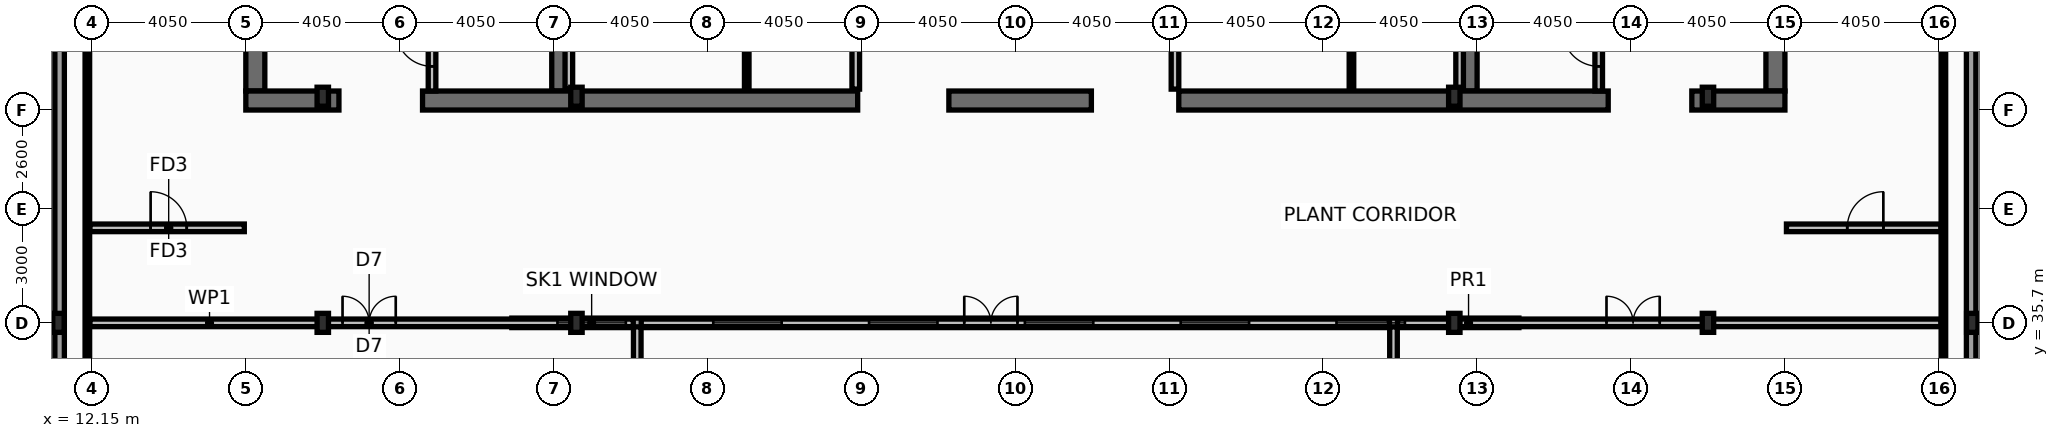
"""IFC4 building model, lengths in metres.
Left out: names, types, materials, properties, quantities, classifications, styles, units other than length and angle.
Written with IfcOpenShell. Run it as: python <this file> out.ifc"""

import sys

from ifc_helpers import new_model, si_unit, direction, frame, frame_2d, origin, origin_2d, place, context, subcontext, project, spatial, rectangle, i_section, extrude, element, fill, save


model = new_model("IFC4")
c1 = context("Model", 3, precision=1e-05, world=origin(), true_north=direction((0.0, 1.0)))
c2 = subcontext(c1, "Body", "Model", "MODEL_VIEW")
j1 = project(units=[si_unit("LENGTHUNIT", "METRE"), si_unit("PLANEANGLEUNIT", "RADIAN")], contexts=[c1])
p1 = place(None, origin())
s1 = spatial("IfcSite", under=j1, at=p1, CompositionType="ELEMENT")
p2 = place(p1, origin())
s2 = spatial("IfcBuilding", under=s1, at=p2, CompositionType="ELEMENT")
p3 = place(p2, frame((0.0, 0.0, 378.6)))
s3 = spatial("IfcBuildingStorey", under=s2, at=p3, CompositionType="ELEMENT", Elevation=378.6)
for number, where, z_axis, x_axis in (
    (1, (16.45, 41.8, 0.0), (0.0, 0.0, 1.0), (0.0, 1.0, 0.0)),
    (2, (56.45, 53.2, 0.0), (0.0, 0.0, 1.0), (0.0, -1.0, 0.0)),
):
    element("IfcWall", number, at=place(p3, frame(where, z_axis=z_axis, x_axis=x_axis)), inside=s3, PredefinedType="SHEAR", context=c2, shape_type="SweptSolid", body=[
        extrude(rectangle(XDim=11.4, YDim=0.5, at=frame_2d((5.7, 0.0))), origin(), (0.0, 0.0, 1.0), 4.0),
    ])
for number, where, z_axis, x_axis in (
    (3, (24.45, 41.8, 0.0), (0.0, 0.0, 1.0), (0.0, 1.0, 0.0)),
    (4, (48.4, 41.8, 0.0), (0.0, 0.0, 1.0), (0.0, 1.0, 0.0)),
):
    element("IfcWall", number, at=place(p3, frame(where, z_axis=z_axis, x_axis=x_axis)), inside=s3, PredefinedType="SHEAR", context=c2, shape_type="SweptSolid", body=[
        extrude(rectangle(XDim=11.4, YDim=0.4, at=frame_2d((5.7, 0.0))), origin(), (0.0, 0.0, 1.0), 4.0),
    ])
p4 = place(p3, frame((18.65, 41.55, 0.0), z_axis=(0.0, 0.0, 1.0), x_axis=(-1.0, 0.0, 0.0)))
e5 = element("IfcWall", 5, at=p4, inside=s3, PredefinedType="SHEAR", context=c2, shape_type="SweptSolid", body=[
    extrude(rectangle(XDim=2.45, YDim=0.5, at=frame_2d((1.225, 0.0))), origin(), (0.0, 0.0, 1.0), 4.0),
])
p5 = place(p3, frame((32.3, 41.55, 0.0), z_axis=(0.0, 0.0, 1.0), x_axis=(-1.0, 0.0, 0.0)))
e6 = element("IfcWall", 6, at=p5, inside=s3, PredefinedType="SHEAR", context=c2, shape_type="SweptSolid", body=[
    extrude(rectangle(XDim=11.45, YDim=0.5, at=frame_2d((5.725, 0.0))), origin(), (0.0, 0.0, 1.0), 4.0),
])
p6 = place(p3, frame((38.45, 41.55, 0.0), z_axis=(0.0, 0.0, 1.0), x_axis=(-1.0, 0.0, 0.0)))
e7 = element("IfcWall", 7, at=p6, inside=s3, PredefinedType="SHEAR", context=c2, shape_type="SweptSolid", body=[
    extrude(rectangle(XDim=3.75, YDim=0.5, at=frame_2d((1.875, 0.0))), origin(), (0.0, 0.0, 1.0), 4.0),
])
p7 = place(p3, frame((52.05, 41.55, 0.0), z_axis=(0.0, 0.0, 1.0), x_axis=(-1.0, 0.0, 0.0)))
e8 = element("IfcWall", 8, at=p7, inside=s3, PredefinedType="SHEAR", context=c2, shape_type="SweptSolid", body=[
    extrude(rectangle(XDim=11.3, YDim=0.5, at=frame_2d((5.65, 0.0))), origin(), (0.0, 0.0, 1.0), 4.0),
])
p8 = place(p3, frame((56.7, 41.55, 0.0), z_axis=(0.0, 0.0, 1.0), x_axis=(-1.0, 0.0, 0.0)))
e9 = element("IfcWall", 9, at=p8, inside=s3, PredefinedType="SHEAR", context=c2, shape_type="SweptSolid", body=[
    extrude(rectangle(XDim=2.45, YDim=0.5, at=frame_2d((1.225, 0.0))), origin(), (0.0, 0.0, 1.0), 4.0),
])
for number, where, z_axis, x_axis in (
    (10, (11.27, 35.7, 0.0), (0.0, 0.0, 1.0), (1.0, 0.0, 0.0)),
    (11, (61.63, 35.7, 0.0), (0.0, 0.0, 1.0), (1.0, 0.0, 0.0)),
):
    element("IfcColumn", number, at=place(p3, frame(where, z_axis=z_axis, x_axis=x_axis)), inside=s3, PredefinedType="COLUMN", context=c2, shape_type="SweptSolid", body=[
        extrude(i_section(OverallWidth=0.3, OverallDepth=0.5, WebThickness=0.014, FlangeThickness=0.028, at=origin_2d()), origin(), (0.0, 0.0, 1.0), 5.36),
    ])
p9 = place(p3, frame((18.225, 35.7, 0.0), z_axis=(0.0, 0.0, 1.0), x_axis=(1.0, 0.0, 0.0)))
e12 = element("IfcColumn", 12, at=p9, inside=s3, PredefinedType="COLUMN", context=c2, shape_type="SweptSolid", body=[
    extrude(i_section(OverallWidth=0.3, OverallDepth=0.5, WebThickness=0.014, FlangeThickness=0.028, at=origin_2d()), origin(), (0.0, 0.0, 1.0), 5.28),
])
p10 = place(p3, frame((18.225, 41.65, 0.0), z_axis=(0.0, 0.0, 1.0), x_axis=(1.0, 0.0, 0.0)))
e13 = element("IfcColumn", 13, at=p10, inside=s3, PredefinedType="COLUMN", context=c2, shape_type="SweptSolid", body=[
    extrude(i_section(OverallWidth=0.3, OverallDepth=0.5, WebThickness=0.014, FlangeThickness=0.028, at=origin_2d()), origin(), (0.0, 0.0, 1.0), 4.1),
])
for number, where, z_axis, x_axis in (
    (14, (24.9, 35.7, 0.0), (0.0, 0.0, 1.0), (1.0, 0.0, 0.0)),
    (15, (24.9, 41.65, 0.0), (0.0, 0.0, 1.0), (1.0, 0.0, 0.0)),
    (16, (48.0, 35.7, 0.0), (0.0, 0.0, 1.0), (1.0, 0.0, 0.0)),
    (17, (48.0, 41.65, 0.0), (0.0, 0.0, 1.0), (1.0, 0.0, 0.0)),
):
    element("IfcColumn", number, at=place(p3, frame(where, z_axis=z_axis, x_axis=x_axis)), inside=s3, PredefinedType="COLUMN", context=c2, shape_type="SweptSolid", body=[
        extrude(i_section(OverallWidth=0.3, OverallDepth=0.5, WebThickness=0.014, FlangeThickness=0.028, at=origin_2d()), origin(), (0.0, 0.0, 1.0), 5.36),
    ])
p11 = place(p3, frame((54.675, 35.7, 0.0), z_axis=(0.0, 0.0, 1.0), x_axis=(1.0, 0.0, 0.0)))
e18 = element("IfcColumn", 18, at=p11, inside=s3, PredefinedType="COLUMN", context=c2, shape_type="SweptSolid", body=[
    extrude(i_section(OverallWidth=0.3, OverallDepth=0.5, WebThickness=0.014, FlangeThickness=0.028, at=origin_2d()), origin(), (0.0, 0.0, 1.0), 5.28),
])
p12 = place(p3, frame((54.675, 41.65, 0.0), z_axis=(0.0, 0.0, 1.0), x_axis=(1.0, 0.0, 0.0)))
e19 = element("IfcColumn", 19, at=p12, inside=s3, PredefinedType="COLUMN", context=c2, shape_type="SweptSolid", body=[
    extrude(i_section(OverallWidth=0.3, OverallDepth=0.5, WebThickness=0.014, FlangeThickness=0.028, at=origin_2d()), origin(), (0.0, 0.0, 1.0), 4.1),
])
p13 = place(p3, frame((23.2, 35.7, 5.6), z_axis=(0.0, 0.0, 1.0), x_axis=(1.0, 0.0, 0.0)))
e20 = element("IfcWall", 20, at=p13, inside=s3, PredefinedType="PARAPET", context=c2, shape_type="SweptSolid", body=[
    extrude(rectangle(XDim=26.5, YDim=0.25, at=frame_2d((13.25, 0.0))), origin(), (0.0, 0.0, 1.0), 0.93),
])
p14 = place(p13, frame((1.2, 0.0, 0.16)))
e21 = element("IfcOpeningElement", 21, at=p14, cuts=e20, PredefinedType="OPENING", context=c2, shape_type="SweptSolid", body=[
    extrude(rectangle(XDim=1.8, YDim=0.55, at=frame_2d((0.9, 0.275))), frame((0.0, 0.135, 0.0), z_axis=(0.0, -1.0, 0.0), x_axis=(1.0, 0.0, 0.0)), (0.0, 0.0, 1.0), 0.27),
])
p15 = place(p13, frame((5.3, 0.0, 0.16)))
e22 = element("IfcOpeningElement", 22, at=p15, cuts=e20, PredefinedType="OPENING", context=c2, shape_type="SweptSolid", body=[
    extrude(rectangle(XDim=1.8, YDim=0.55, at=frame_2d((0.9, 0.275))), frame((0.0, 0.135, 0.0), z_axis=(0.0, -1.0, 0.0), x_axis=(1.0, 0.0, 0.0)), (0.0, 0.0, 1.0), 0.27),
])
p16 = place(p13, frame((9.4, 0.0, 0.16)))
e23 = element("IfcOpeningElement", 23, at=p16, cuts=e20, PredefinedType="OPENING", context=c2, shape_type="SweptSolid", body=[
    extrude(rectangle(XDim=1.8, YDim=0.55, at=frame_2d((0.9, 0.275))), frame((0.0, 0.135, 0.0), z_axis=(0.0, -1.0, 0.0), x_axis=(1.0, 0.0, 0.0)), (0.0, 0.0, 1.0), 0.27),
])
p17 = place(p13, frame((13.5, 0.0, 0.16)))
e24 = element("IfcOpeningElement", 24, at=p17, cuts=e20, PredefinedType="OPENING", context=c2, shape_type="SweptSolid", body=[
    extrude(rectangle(XDim=1.8, YDim=0.55, at=frame_2d((0.9, 0.275))), frame((0.0, 0.135, 0.0), z_axis=(0.0, -1.0, 0.0), x_axis=(1.0, 0.0, 0.0)), (0.0, 0.0, 1.0), 0.27),
])
p18 = place(p13, frame((17.6, 0.0, 0.16)))
e25 = element("IfcOpeningElement", 25, at=p18, cuts=e20, PredefinedType="OPENING", context=c2, shape_type="SweptSolid", body=[
    extrude(rectangle(XDim=1.8, YDim=0.55, at=frame_2d((0.9, 0.275))), frame((0.0, 0.135, 0.0), z_axis=(0.0, -1.0, 0.0), x_axis=(1.0, 0.0, 0.0)), (0.0, 0.0, 1.0), 0.27),
])
p19 = place(p13, frame((21.7, 0.0, 0.16)))
e26 = element("IfcOpeningElement", 26, at=p19, cuts=e20, PredefinedType="OPENING", context=c2, shape_type="SweptSolid", body=[
    extrude(rectangle(XDim=1.8, YDim=0.55, at=frame_2d((0.9, 0.275))), frame((0.0, 0.135, 0.0), z_axis=(0.0, -1.0, 0.0), x_axis=(1.0, 0.0, 0.0)), (0.0, 0.0, 1.0), 0.27),
])
for number, where, z_axis, x_axis in (
    (27, (11.3, 49.35, 5.58), (0.0, 0.0, 1.0), (0.0, -1.0, 0.0)),
    (28, (61.6, 14.05, 5.58), (0.0, 0.0, 1.0), (0.0, 1.0, 0.0)),
):
    element("IfcWall", number, at=place(p3, frame(where, z_axis=z_axis, x_axis=x_axis)), inside=s3, PredefinedType="PARAPET", context=c2, shape_type="SweptSolid", body=[
        extrude(rectangle(XDim=35.3, YDim=0.25, at=frame_2d((17.65, 0.0))), origin(), (0.0, 0.0, 1.0), 0.9),
    ])
p20 = place(p3, frame((21.1, 41.8, 0.0), z_axis=(0.0, 0.0, 1.0), x_axis=(0.0, 1.0, 0.0)))
e29 = element("IfcWall", 29, at=p20, inside=s3, PredefinedType="PARTITIONING", context=c2, shape_type="SweptSolid", body=[
    extrude(rectangle(XDim=4.215, YDim=0.2, at=frame_2d((2.107, 0.0))), origin(), (0.0, 0.0, 1.0), 4.18),
])
p21 = place(p20, frame((0.65, 0.0, 0.0)))
e30 = element("IfcOpeningElement", 30, at=p21, cuts=e29, PredefinedType="OPENING", context=c2, shape_type="SweptSolid", body=[
    extrude(rectangle(XDim=0.95, YDim=2.1, at=frame_2d((0.475, 1.05))), frame((0.0, 0.11, 0.0), z_axis=(0.0, -1.0, 0.0), x_axis=(1.0, 0.0, 0.0)), (0.0, 0.0, 1.0), 0.22),
])
p22 = place(p3, frame((51.8, 41.8, 0.0), z_axis=(0.0, 0.0, 1.0), x_axis=(0.0, 1.0, 0.0)))
e31 = element("IfcWall", 31, at=p22, inside=s3, PredefinedType="PARTITIONING", context=c2, shape_type="SweptSolid", body=[
    extrude(rectangle(XDim=4.215, YDim=0.2, at=frame_2d((2.107, 0.0))), origin(), (0.0, 0.0, 1.0), 4.18),
])
p23 = place(p22, frame((0.65, 0.0, 0.0)))
e32 = element("IfcOpeningElement", 32, at=p23, cuts=e31, PredefinedType="OPENING", context=c2, shape_type="SweptSolid", body=[
    extrude(rectangle(XDim=0.95, YDim=2.1, at=frame_2d((0.475, 1.05))), frame((0.0, 0.11, 0.0), z_axis=(0.0, -1.0, 0.0), x_axis=(1.0, 0.0, 0.0)), (0.0, 0.0, 1.0), 0.22),
])
for number, where, z_axis, x_axis in (
    (33, (24.7, 41.85, 0.0), (0.0, 0.0, 1.0), (0.0, 1.0, 0.0)),
    (34, (32.25, 41.85, 0.0), (0.0, 0.0, 1.0), (0.0, 1.0, 0.0)),
):
    element("IfcWall", number, at=place(p3, frame(where, z_axis=z_axis, x_axis=x_axis)), inside=s3, PredefinedType="PARTITIONING", context=c2, shape_type="SweptSolid", body=[
        extrude(rectangle(XDim=2.395, YDim=0.2, at=frame_2d((1.198, 0.0))), origin(), (0.0, 0.0, 1.0), 4.18),
    ])
p24 = place(p3, frame((29.381, 41.85, 0.0), z_axis=(0.0, 0.0, 1.0), x_axis=(0.0, 1.0, 0.0)))
e35 = element("IfcWall", 35, at=p24, inside=s3, PredefinedType="PARTITIONING", context=c2, shape_type="SweptSolid", body=[
    extrude(rectangle(XDim=2.395, YDim=0.12, at=frame_2d((1.198, 0.0))), origin(), (0.0, 0.0, 1.0), 4.18),
])
for number, where, z_axis, x_axis in (
    (36, (40.65, 41.85, 0.0), (0.0, 0.0, 1.0), (0.0, 1.0, 0.0)),
    (37, (48.14, 41.85, 0.0), (0.0, 0.0, 1.0), (0.0, 1.0, 0.0)),
):
    element("IfcWall", number, at=place(p3, frame(where, z_axis=z_axis, x_axis=x_axis)), inside=s3, PredefinedType="PARTITIONING", context=c2, shape_type="SweptSolid", body=[
        extrude(rectangle(XDim=2.395, YDim=0.2, at=frame_2d((1.198, 0.0))), origin(), (0.0, 0.0, 1.0), 4.18),
    ])
p25 = place(p3, frame((45.294, 41.85, 0.0), z_axis=(0.0, 0.0, 1.0), x_axis=(0.0, 1.0, 0.0)))
e38 = element("IfcWall", 38, at=p25, inside=s3, PredefinedType="PARTITIONING", context=c2, shape_type="SweptSolid", body=[
    extrude(rectangle(XDim=2.395, YDim=0.12, at=frame_2d((1.198, 0.0))), origin(), (0.0, 0.0, 1.0), 4.18),
])
p26 = place(p3, frame((12.095, 35.7, 0.0), z_axis=(0.0, 0.0, 1.0), x_axis=(1.0, 0.0, 0.0)))
e39 = element("IfcWall", 39, at=p26, inside=s3, PredefinedType="PARTITIONING", context=c2, shape_type="SweptSolid", body=[
    extrude(rectangle(XDim=14.3, YDim=0.2, at=frame_2d((7.15, 0.0))), origin(), (0.0, 0.0, 1.0), 4.18),
])
p27 = place(p26, frame((6.65, 0.0, 0.0)))
e40 = element("IfcOpeningElement", 40, at=p27, cuts=e39, PredefinedType="OPENING", context=c2, shape_type="SweptSolid", body=[
    extrude(rectangle(XDim=1.4, YDim=2.15, at=frame_2d((0.7, 1.075))), frame((0.0, 0.11, 0.0), z_axis=(0.0, -1.0, 0.0), x_axis=(1.0, 0.0, 0.0)), (0.0, 0.0, 1.0), 0.22),
])
p28 = place(p3, frame((26.605, 35.7, 0.0), z_axis=(0.0, 0.0, 1.0), x_axis=(1.0, 0.0, 0.0)))
e41 = element("IfcWall", 41, at=p28, inside=s3, PredefinedType="PARTITIONING", context=c2, shape_type="SweptSolid", body=[
    extrude(rectangle(XDim=19.69, YDim=0.2, at=frame_2d((9.845, 0.0))), origin(), (0.0, 0.0, 1.0), 4.18),
])
p29 = place(p28, frame((8.5, 0.0, 0.0)))
e42 = element("IfcOpeningElement", 42, at=p29, cuts=e41, PredefinedType="OPENING", context=c2, shape_type="SweptSolid", body=[
    extrude(rectangle(XDim=1.4, YDim=2.15, at=frame_2d((0.7, 1.075))), frame((0.0, 0.11, 0.0), z_axis=(0.0, -1.0, 0.0), x_axis=(1.0, 0.0, 0.0)), (0.0, 0.0, 1.0), 0.22),
])
p30 = place(p3, frame((46.505, 35.7, 0.0), z_axis=(0.0, 0.0, 1.0), x_axis=(1.0, 0.0, 0.0)))
e43 = element("IfcWall", 43, at=p30, inside=s3, PredefinedType="PARTITIONING", context=c2, shape_type="SweptSolid", body=[
    extrude(rectangle(XDim=14.3, YDim=0.2, at=frame_2d((7.15, 0.0))), origin(), (0.0, 0.0, 1.0), 4.18),
])
p31 = place(p30, frame((5.5, 0.0, 0.0)))
e44 = element("IfcOpeningElement", 44, at=p31, cuts=e43, PredefinedType="OPENING", context=c2, shape_type="SweptSolid", body=[
    extrude(rectangle(XDim=1.4, YDim=2.15, at=frame_2d((0.7, 1.075))), frame((0.0, 0.11, 0.0), z_axis=(0.0, -1.0, 0.0), x_axis=(1.0, 0.0, 0.0)), (0.0, 0.0, 1.0), 0.22),
])
for number, where, z_axis, x_axis in (
    (45, (26.5, 10.665, 0.0), (0.0, 0.0, 1.0), (0.0, 1.0, 0.0)),
    (46, (46.4, 10.665, 0.0), (0.0, 0.0, 1.0), (0.0, 1.0, 0.0)),
):
    element("IfcWall", number, at=place(p3, frame(where, z_axis=z_axis, x_axis=x_axis)), inside=s3, PredefinedType="PARTITIONING", context=c2, shape_type="SweptSolid", body=[
        extrude(rectangle(XDim=24.93, YDim=0.2, at=frame_2d((12.465, 0.0))), origin(), (0.0, 0.0, 1.0), 4.18),
    ])
p32 = place(p3, frame((12.095, 38.2, 0.0), z_axis=(0.0, 0.0, 1.0), x_axis=(1.0, 0.0, 0.0)))
e47 = element("IfcWall", 47, at=p32, inside=s3, PredefinedType="PARTITIONING", context=c2, shape_type="SweptSolid", body=[
    extrude(rectangle(XDim=4.065, YDim=0.2, at=frame_2d((2.032, 0.0))), origin(), (0.0, 0.0, 1.0), 4.18),
])
p33 = place(p32, frame((1.6, 0.0, 0.0)))
e48 = element("IfcOpeningElement", 48, at=p33, cuts=e47, PredefinedType="OPENING", context=c2, shape_type="SweptSolid", body=[
    extrude(rectangle(XDim=0.95, YDim=2.1, at=frame_2d((0.475, 1.05))), frame((0.0, 0.11, 0.0), z_axis=(0.0, -1.0, 0.0), x_axis=(1.0, 0.0, 0.0)), (0.0, 0.0, 1.0), 0.22),
])
p34 = place(p3, frame((56.74, 38.2, 0.0), z_axis=(0.0, 0.0, 1.0), x_axis=(1.0, 0.0, 0.0)))
e49 = element("IfcWall", 49, at=p34, inside=s3, PredefinedType="PARTITIONING", context=c2, shape_type="SweptSolid", body=[
    extrude(rectangle(XDim=4.065, YDim=0.2, at=frame_2d((2.032, 0.0))), origin(), (0.0, 0.0, 1.0), 4.18),
])
p35 = place(p34, frame((1.6, 0.0, 0.0)))
e50 = element("IfcOpeningElement", 50, at=p35, cuts=e49, PredefinedType="OPENING", context=c2, shape_type="SweptSolid", body=[
    extrude(rectangle(XDim=0.95, YDim=2.1, at=frame_2d((0.475, 1.05))), frame((0.0, 0.11, 0.0), z_axis=(0.0, -1.0, 0.0), x_axis=(1.0, 0.0, 0.0)), (0.0, 0.0, 1.0), 0.22),
])
for number, where, z_axis, x_axis in (
    (51, (12.03, 10.665, 0.0), (0.0, 0.0, 1.0), (0.0, 1.0, 0.0)),
    (52, (60.87, 10.665, 0.0), (0.0, 0.0, 1.0), (0.0, 1.0, 0.0)),
):
    element("IfcWall", number, at=place(p3, frame(where, z_axis=z_axis, x_axis=x_axis)), inside=s3, PredefinedType="PARTITIONING", context=c2, shape_type="SweptSolid", body=[
        extrude(rectangle(XDim=42.11, YDim=0.12, at=frame_2d((21.055, 0.0))), origin(), (0.0, 0.0, 1.0), 4.18),
    ])
p36 = place(p14, origin())
e53 = element("IfcWindow", 53, at=p36, inside=s3, PartitioningType="SINGLE_PANEL", PredefinedType="SKYLIGHT", context=c2, shape_type="SweptSolid", body=[
    extrude(rectangle(XDim=1.8, YDim=0.55, at=frame_2d((0.9, 0.275))), frame((0.0, 0.03, 0.0), z_axis=(0.0, -1.0, 0.0), x_axis=(1.0, 0.0, 0.0)), (0.0, 0.0, 1.0), 0.06),
])
fill(e21, e53)
p37 = place(p15, origin())
e54 = element("IfcWindow", 54, at=p37, inside=s3, PartitioningType="SINGLE_PANEL", PredefinedType="SKYLIGHT", context=c2, shape_type="SweptSolid", body=[
    extrude(rectangle(XDim=1.8, YDim=0.55, at=frame_2d((0.9, 0.275))), frame((0.0, 0.03, 0.0), z_axis=(0.0, -1.0, 0.0), x_axis=(1.0, 0.0, 0.0)), (0.0, 0.0, 1.0), 0.06),
])
fill(e22, e54)
p38 = place(p16, origin())
e55 = element("IfcWindow", 55, at=p38, inside=s3, PartitioningType="SINGLE_PANEL", PredefinedType="SKYLIGHT", context=c2, shape_type="SweptSolid", body=[
    extrude(rectangle(XDim=1.8, YDim=0.55, at=frame_2d((0.9, 0.275))), frame((0.0, 0.03, 0.0), z_axis=(0.0, -1.0, 0.0), x_axis=(1.0, 0.0, 0.0)), (0.0, 0.0, 1.0), 0.06),
])
fill(e23, e55)
p39 = place(p17, origin())
e56 = element("IfcWindow", 56, at=p39, inside=s3, PartitioningType="SINGLE_PANEL", PredefinedType="SKYLIGHT", context=c2, shape_type="SweptSolid", body=[
    extrude(rectangle(XDim=1.8, YDim=0.55, at=frame_2d((0.9, 0.275))), frame((0.0, 0.03, 0.0), z_axis=(0.0, -1.0, 0.0), x_axis=(1.0, 0.0, 0.0)), (0.0, 0.0, 1.0), 0.06),
])
fill(e24, e56)
p40 = place(p18, origin())
e57 = element("IfcWindow", 57, at=p40, inside=s3, PartitioningType="SINGLE_PANEL", PredefinedType="SKYLIGHT", context=c2, shape_type="SweptSolid", body=[
    extrude(rectangle(XDim=1.8, YDim=0.55, at=frame_2d((0.9, 0.275))), frame((0.0, 0.03, 0.0), z_axis=(0.0, -1.0, 0.0), x_axis=(1.0, 0.0, 0.0)), (0.0, 0.0, 1.0), 0.06),
])
fill(e25, e57)
p41 = place(p19, origin())
e58 = element("IfcWindow", 58, at=p41, inside=s3, PartitioningType="SINGLE_PANEL", PredefinedType="SKYLIGHT", context=c2, shape_type="SweptSolid", body=[
    extrude(rectangle(XDim=1.8, YDim=0.55, at=frame_2d((0.9, 0.275))), frame((0.0, 0.03, 0.0), z_axis=(0.0, -1.0, 0.0), x_axis=(1.0, 0.0, 0.0)), (0.0, 0.0, 1.0), 0.06),
])
fill(e26, e58)
p42 = place(p21, origin())
e59 = element("IfcDoor", 59, at=p42, inside=s3, OperationType="SINGLE_SWING_RIGHT", PredefinedType="DOOR", context=c2, shape_type="SweptSolid", body=[
    extrude(rectangle(XDim=0.95, YDim=2.1, at=frame_2d((0.475, 1.05))), frame((0.0, 0.025, 0.0), z_axis=(0.0, -1.0, 0.0), x_axis=(1.0, 0.0, 0.0)), (0.0, 0.0, 1.0), 0.05),
])
fill(e30, e59)
p43 = place(p23, origin())
e60 = element("IfcDoor", 60, at=p43, inside=s3, OperationType="SINGLE_SWING_RIGHT", PredefinedType="DOOR", context=c2, shape_type="SweptSolid", body=[
    extrude(rectangle(XDim=0.95, YDim=2.1, at=frame_2d((0.475, 1.05))), frame((0.0, 0.025, 0.0), z_axis=(0.0, -1.0, 0.0), x_axis=(1.0, 0.0, 0.0)), (0.0, 0.0, 1.0), 0.05),
])
fill(e32, e60)
p44 = place(p27, origin())
e61 = element("IfcDoor", 61, at=p44, inside=s3, OperationType="DOUBLE_DOOR_SINGLE_SWING", PredefinedType="DOOR", context=c2, shape_type="SweptSolid", body=[
    extrude(rectangle(XDim=1.4, YDim=2.15, at=frame_2d((0.7, 1.075))), frame((0.0, 0.025, 0.0), z_axis=(0.0, -1.0, 0.0), x_axis=(1.0, 0.0, 0.0)), (0.0, 0.0, 1.0), 0.05),
])
fill(e40, e61)
p45 = place(p29, origin())
e62 = element("IfcDoor", 62, at=p45, inside=s3, OperationType="DOUBLE_DOOR_SINGLE_SWING", PredefinedType="DOOR", context=c2, shape_type="SweptSolid", body=[
    extrude(rectangle(XDim=1.4, YDim=2.15, at=frame_2d((0.7, 1.075))), frame((0.0, 0.025, 0.0), z_axis=(0.0, -1.0, 0.0), x_axis=(1.0, 0.0, 0.0)), (0.0, 0.0, 1.0), 0.05),
])
fill(e42, e62)
p46 = place(p31, origin())
e63 = element("IfcDoor", 63, at=p46, inside=s3, OperationType="DOUBLE_DOOR_SINGLE_SWING", PredefinedType="DOOR", context=c2, shape_type="SweptSolid", body=[
    extrude(rectangle(XDim=1.4, YDim=2.15, at=frame_2d((0.7, 1.075))), frame((0.0, 0.025, 0.0), z_axis=(0.0, -1.0, 0.0), x_axis=(1.0, 0.0, 0.0)), (0.0, 0.0, 1.0), 0.05),
])
fill(e44, e63)
p47 = place(p33, origin())
e64 = element("IfcDoor", 64, at=p47, inside=s3, OperationType="SINGLE_SWING_LEFT", PredefinedType="DOOR", context=c2, shape_type="SweptSolid", body=[
    extrude(rectangle(XDim=0.95, YDim=2.1, at=frame_2d((0.475, 1.05))), frame((0.0, 0.025, 0.0), z_axis=(0.0, -1.0, 0.0), x_axis=(1.0, 0.0, 0.0)), (0.0, 0.0, 1.0), 0.05),
])
fill(e48, e64)
p48 = place(p35, origin())
e65 = element("IfcDoor", 65, at=p48, inside=s3, OperationType="SINGLE_SWING_RIGHT", PredefinedType="DOOR", context=c2, shape_type="SweptSolid", body=[
    extrude(rectangle(XDim=0.95, YDim=2.1, at=frame_2d((0.475, 1.05))), frame((0.0, 0.025, 0.0), z_axis=(0.0, -1.0, 0.0), x_axis=(1.0, 0.0, 0.0)), (0.0, 0.0, 1.0), 0.05),
])
fill(e50, e65)
save(model, sys.argv[1])
